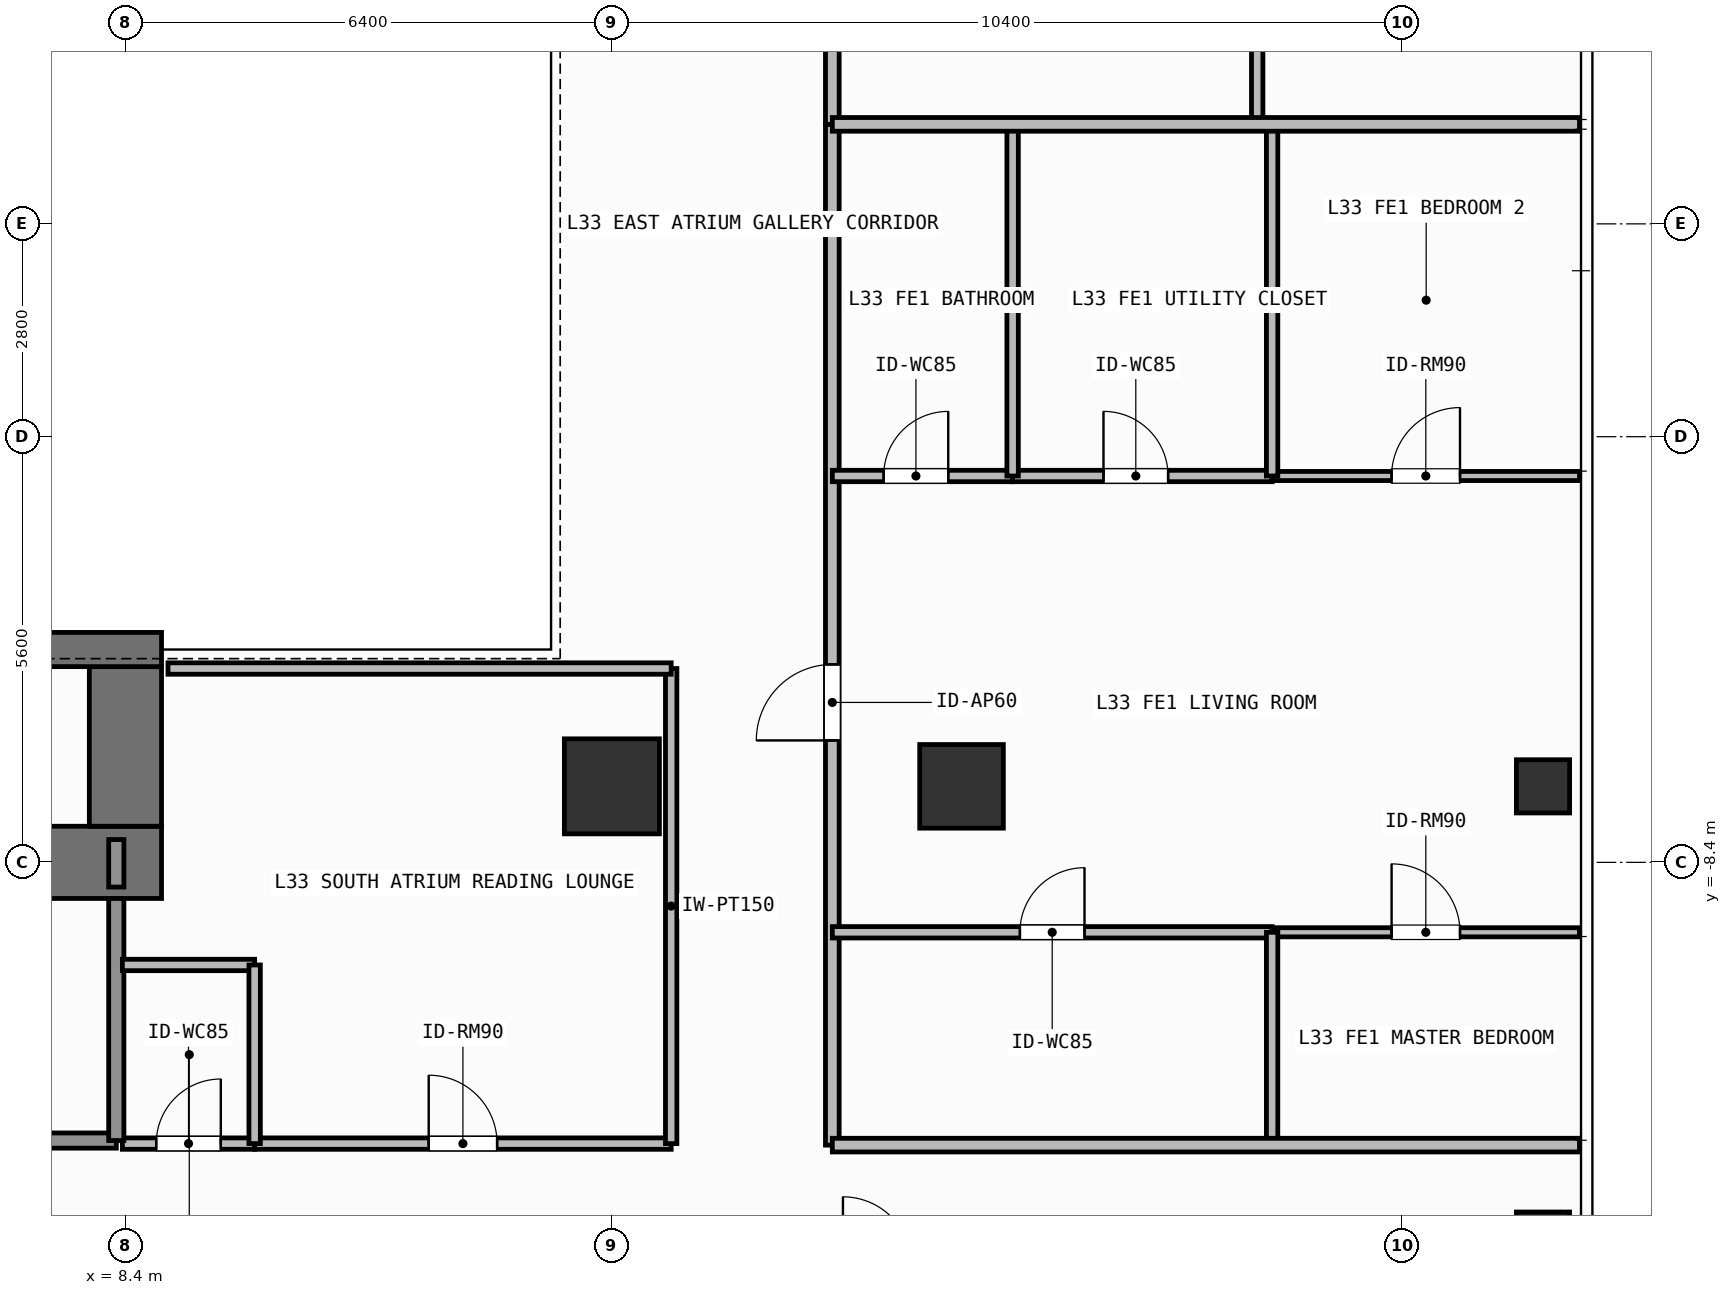
"""IFC4 building model, lengths in metres.
Left out: names, types, materials, properties, quantities, classifications, styles, units other than length and angle.
Written with IfcOpenShell. Run it as: python <this file> out.ifc"""

import sys

from ifc_helpers import new_model, si_unit, direction, frame, frame_2d, origin, origin_2d, place, context, subcontext, project, spatial, rectangle, hollow_rectangle, extrude, element, fill, save


model = new_model("IFC4")
c1 = context("Model", 3, precision=1e-05, world=origin(), true_north=direction((0.0, 1.0)))
c2 = subcontext(c1, "Body", "Model", "MODEL_VIEW")
j1 = project(units=[si_unit("LENGTHUNIT", "METRE"), si_unit("PLANEANGLEUNIT", "RADIAN")], contexts=[c1])
p1 = place(None, origin())
s1 = spatial("IfcSite", under=j1, at=p1, CompositionType="ELEMENT")
p2 = place(p1, origin())
s2 = spatial("IfcBuilding", under=s1, at=p2, CompositionType="ELEMENT")
p3 = place(p2, frame((0.0, 0.0, 132.9)))
s3 = spatial("IfcBuildingStorey", under=s2, at=p3, CompositionType="ELEMENT", Elevation=132.9)
p4 = place(p3, frame((6.12, -8.4, 0.0), z_axis=(0.0, 0.0, 1.0), x_axis=(1.0, 0.0, 0.0)))
e1 = element("IfcWall", 1, at=p4, inside=s3, PredefinedType="SHEAR", context=c2, shape_type="SweptSolid", body=[
    extrude(rectangle(XDim=2.755, YDim=0.95, at=frame_2d((1.377, 0.0))), origin(), (0.0, 0.0, 1.0), 3.9),
])
p5 = place(p3, frame((8.4, -7.925, 0.0), z_axis=(0.0, 0.0, 1.0), x_axis=(0.0, 1.0, 0.0)))
e2 = element("IfcWall", 2, at=p5, inside=s3, PredefinedType="SHEAR", context=c2, shape_type="SweptSolid", body=[
    extrude(rectangle(XDim=2.1, YDim=0.95, at=frame_2d((1.05, 0.0))), origin(), (0.0, 0.0, 1.0), 3.9),
])
p6 = place(p3, frame((3.045, -5.6, 0.0), z_axis=(0.0, 0.0, 1.0), x_axis=(1.0, 0.0, 0.0)))
e3 = element("IfcWall", 3, at=p6, inside=s3, PredefinedType="SHEAR", context=c2, shape_type="SweptSolid", body=[
    extrude(rectangle(XDim=5.83, YDim=0.45, at=frame_2d((2.915, 0.0))), origin(), (0.0, 0.0, 1.0), 3.9),
])
p7 = place(p3, frame((14.8, -7.4, 0.0), z_axis=(0.0, 0.0, 1.0), x_axis=(1.0, 0.0, 0.0)))
e4 = element("IfcColumn", 4, at=p7, inside=s3, PredefinedType="COLUMN", context=c2, shape_type="SweptSolid", body=[
    extrude(rectangle(XDim=1.25, YDim=1.25, at=origin_2d()), origin(), (0.0, 0.0, 1.0), 3.9),
])
p8 = place(p3, frame((19.4, -7.4, 0.0), z_axis=(0.0, 0.0, 1.0), x_axis=(1.0, 0.0, 0.0)))
e5 = element("IfcColumn", 5, at=p8, inside=s3, PredefinedType="COLUMN", context=c2, shape_type="SweptSolid", body=[
    extrude(rectangle(XDim=1.1, YDim=1.1, at=origin_2d()), origin(), (0.0, 0.0, 1.0), 3.9),
])
for number, where, z_axis, x_axis in (
    (6, (27.05, -13.35, 0.0), (0.0, 0.0, 1.0), (1.0, 0.0, 0.0)),
    (7, (27.05, -7.4, 0.0), (0.0, 0.0, 1.0), (1.0, 0.0, 0.0)),
):
    element("IfcColumn", number, at=place(p3, frame(where, z_axis=z_axis, x_axis=x_axis)), inside=s3, PredefinedType="COLUMN", context=c2, shape_type="SweptSolid", body=[
        extrude(hollow_rectangle(XDim=0.7, YDim=0.7, WallThickness=0.032, at=origin_2d()), origin(), (0.0, 0.0, 1.0), 3.9),
    ])
p9 = place(p3, frame((4.58, -12.06, 0.0), z_axis=(0.0, 0.0, 1.0), x_axis=(1.0, 0.0, 0.0)))
e8 = element("IfcWall", 8, at=p9, inside=s3, PredefinedType="SOLIDWALL", context=c2, shape_type="SweptSolid", body=[
    extrude(rectangle(XDim=3.7, YDim=0.2, at=frame_2d((1.85, 0.0))), origin(), (0.0, 0.0, 1.0), 3.62),
])
p10 = place(p9, frame((1.212, 0.0, 0.0)))
e9 = element("IfcOpeningElement", 9, at=p10, cuts=e8, PredefinedType="OPENING", context=c2, shape_type="SweptSolid", body=[
    extrude(rectangle(XDim=1.1, YDim=2.15, at=frame_2d((0.55, 1.075))), frame((0.0, 0.11, 0.0), z_axis=(0.0, -1.0, 0.0), x_axis=(1.0, 0.0, 0.0)), (0.0, 0.0, 1.0), 0.22),
])
p11 = place(p3, frame((8.36, -12.1, 0.0), z_axis=(0.0, 0.0, 1.0), x_axis=(1.0, 0.0, 0.0)))
e10 = element("IfcWall", 10, at=p11, inside=s3, PredefinedType="PARTITIONING", context=c2, shape_type="SweptSolid", body=[
    extrude(rectangle(XDim=1.74, YDim=0.15, at=frame_2d((0.87, 0.0))), origin(), (0.0, 0.0, 1.0), 3.62),
])
p12 = place(p11, frame((0.445, 0.0, 0.0)))
e11 = element("IfcOpeningElement", 11, at=p12, cuts=e10, PredefinedType="OPENING", context=c2, shape_type="SweptSolid", body=[
    extrude(rectangle(XDim=0.85, YDim=2.1, at=frame_2d((0.425, 1.05))), frame((0.0, 0.085, 0.0), z_axis=(0.0, -1.0, 0.0), x_axis=(1.0, 0.0, 0.0)), (0.0, 0.0, 1.0), 0.17),
])
p13 = place(p3, frame((10.1, -12.1, 0.0), z_axis=(0.0, 0.0, 1.0), x_axis=(1.0, 0.0, 0.0)))
e12 = element("IfcWall", 12, at=p13, inside=s3, PredefinedType="PARTITIONING", context=c2, shape_type="SweptSolid", body=[
    extrude(rectangle(XDim=5.48, YDim=0.15, at=frame_2d((2.74, 0.0))), origin(), (0.0, 0.0, 1.0), 3.62),
])
p14 = place(p13, frame((2.29, 0.0, 0.0)))
e13 = element("IfcOpeningElement", 13, at=p14, cuts=e12, PredefinedType="OPENING", context=c2, shape_type="SweptSolid", body=[
    extrude(rectangle(XDim=0.9, YDim=2.1, at=frame_2d((0.45, 1.05))), frame((0.0, 0.085, 0.0), z_axis=(0.0, -1.0, 0.0), x_axis=(1.0, 0.0, 0.0)), (0.0, 0.0, 1.0), 0.17),
])
p15 = place(p3, frame((17.7, -12.12, 0.0), z_axis=(0.0, 0.0, 1.0), x_axis=(0.0, 1.0, 0.0)))
e14 = element("IfcWall", 14, at=p15, inside=s3, PredefinedType="PARTITIONING", context=c2, shape_type="SweptSolid", body=[
    extrude(rectangle(XDim=13.429, YDim=0.18, at=frame_2d((6.715, 0.0))), origin(), (0.0, 0.0, 1.0), 3.62),
])
p16 = place(p15, frame((5.324, 0.0, 0.0)))
e15 = element("IfcOpeningElement", 15, at=p16, cuts=e14, PredefinedType="OPENING", context=c2, shape_type="SweptSolid", body=[
    extrude(rectangle(XDim=1.0, YDim=2.2, at=frame_2d((0.5, 1.1))), frame((0.0, 0.1, 0.0), z_axis=(0.0, -1.0, 0.0), x_axis=(1.0, 0.0, 0.0)), (0.0, 0.0, 1.0), 0.2),
])
p17 = place(p3, frame((17.7, -3.317, 0.0), z_axis=(0.0, 0.0, 1.0), x_axis=(1.0, 0.0, 0.0)))
e16 = element("IfcWall", 16, at=p17, inside=s3, PredefinedType="PARTITIONING", context=c2, shape_type="SweptSolid", body=[
    extrude(rectangle(XDim=2.372, YDim=0.15, at=frame_2d((1.186, 0.0))), origin(), (0.0, 0.0, 1.0), 3.62),
])
p18 = place(p17, frame((0.675, 0.0, 0.0)))
e17 = element("IfcOpeningElement", 17, at=p18, cuts=e16, PredefinedType="OPENING", context=c2, shape_type="SweptSolid", body=[
    extrude(rectangle(XDim=0.85, YDim=2.1, at=frame_2d((0.425, 1.05))), frame((0.0, 0.085, 0.0), z_axis=(0.0, -1.0, 0.0), x_axis=(1.0, 0.0, 0.0)), (0.0, 0.0, 1.0), 0.17),
])
p19 = place(p3, frame((20.072, -3.317, 0.0), z_axis=(0.0, 0.0, 1.0), x_axis=(1.0, 0.0, 0.0)))
e18 = element("IfcWall", 18, at=p19, inside=s3, PredefinedType="PARTITIONING", context=c2, shape_type="SweptSolid", body=[
    extrude(rectangle(XDim=3.414, YDim=0.15, at=frame_2d((1.707, 0.0))), origin(), (0.0, 0.0, 1.0), 3.62),
])
p20 = place(p19, frame((1.196, 0.0, 0.0)))
e19 = element("IfcOpeningElement", 19, at=p20, cuts=e18, PredefinedType="OPENING", context=c2, shape_type="SweptSolid", body=[
    extrude(rectangle(XDim=0.85, YDim=2.1, at=frame_2d((0.425, 1.05))), frame((0.0, 0.085, 0.0), z_axis=(0.0, -1.0, 0.0), x_axis=(1.0, 0.0, 0.0)), (0.0, 0.0, 1.0), 0.17),
])
p21 = place(p3, frame((17.7, -9.32, 0.0), z_axis=(0.0, 0.0, 1.0), x_axis=(1.0, 0.0, 0.0)))
e20 = element("IfcWall", 20, at=p21, inside=s3, PredefinedType="PARTITIONING", context=c2, shape_type="SweptSolid", body=[
    extrude(rectangle(XDim=5.786, YDim=0.15, at=frame_2d((2.893, 0.0))), origin(), (0.0, 0.0, 1.0), 3.62),
])
p22 = place(p21, frame((2.468, 0.0, 0.0)))
e21 = element("IfcOpeningElement", 21, at=p22, cuts=e20, PredefinedType="OPENING", context=c2, shape_type="SweptSolid", body=[
    extrude(rectangle(XDim=0.85, YDim=2.1, at=frame_2d((0.425, 1.05))), frame((0.0, 0.085, 0.0), z_axis=(0.0, -1.0, 0.0), x_axis=(1.0, 0.0, 0.0)), (0.0, 0.0, 1.0), 0.17),
])
p23 = place(p3, frame((23.486, -9.32, 0.0), z_axis=(0.0, 0.0, 1.0), x_axis=(1.0, 0.0, 0.0)))
e22 = element("IfcWall", 22, at=p23, inside=s3, PredefinedType="PARTITIONING", context=c2, shape_type="SweptSolid", body=[
    extrude(rectangle(XDim=4.044, YDim=0.12, at=frame_2d((2.022, 0.0))), origin(), (0.0, 0.0, 1.0), 3.62),
])
p24 = place(p23, frame((1.572, 0.0, 0.0)))
e23 = element("IfcOpeningElement", 23, at=p24, cuts=e22, PredefinedType="OPENING", context=c2, shape_type="SweptSolid", body=[
    extrude(rectangle(XDim=0.9, YDim=2.1, at=frame_2d((0.45, 1.05))), frame((0.0, 0.07, 0.0), z_axis=(0.0, -1.0, 0.0), x_axis=(1.0, 0.0, 0.0)), (0.0, 0.0, 1.0), 0.14),
])
p25 = place(p3, frame((23.486, -3.317, 0.0), z_axis=(0.0, 0.0, 1.0), x_axis=(1.0, 0.0, 0.0)))
e24 = element("IfcWall", 24, at=p25, inside=s3, PredefinedType="PARTITIONING", context=c2, shape_type="SweptSolid", body=[
    extrude(rectangle(XDim=4.044, YDim=0.12, at=frame_2d((2.022, 0.0))), origin(), (0.0, 0.0, 1.0), 3.62),
])
p26 = place(p25, frame((1.572, 0.0, 0.0)))
e25 = element("IfcOpeningElement", 25, at=p26, cuts=e24, PredefinedType="OPENING", context=c2, shape_type="SweptSolid", body=[
    extrude(rectangle(XDim=0.9, YDim=2.1, at=frame_2d((0.45, 1.05))), frame((0.0, 0.07, 0.0), z_axis=(0.0, -1.0, 0.0), x_axis=(1.0, 0.0, 0.0)), (0.0, 0.0, 1.0), 0.14),
])
p27 = place(p3, frame((17.7, 1.309, 0.0), z_axis=(0.0, 0.0, 1.0), x_axis=(0.0, 1.0, 0.0)))
e26 = element("IfcWall", 26, at=p27, inside=s3, PredefinedType="PARTITIONING", context=c2, shape_type="SweptSolid", body=[
    extrude(rectangle(XDim=10.811, YDim=0.18, at=frame_2d((5.406, 0.0))), origin(), (0.0, 0.0, 1.0), 3.62),
])
p28 = place(p27, frame((4.458, 0.0, 0.0)))
e27 = element("IfcOpeningElement", 27, at=p28, cuts=e26, PredefinedType="OPENING", context=c2, shape_type="SweptSolid", body=[
    extrude(rectangle(XDim=1.0, YDim=2.2, at=frame_2d((0.5, 1.1))), frame((0.0, 0.1, 0.0), z_axis=(0.0, -1.0, 0.0), x_axis=(1.0, 0.0, 0.0)), (0.0, 0.0, 1.0), 0.2),
])
p29 = place(p3, frame((8.28, -12.06, 0.0), z_axis=(0.0, 0.0, 1.0), x_axis=(0.0, 1.0, 0.0)))
e28 = element("IfcWall", 28, at=p29, inside=s3, PredefinedType="SOLIDWALL", context=c2, shape_type="SweptSolid", body=[
    extrude(rectangle(XDim=3.185, YDim=0.2, at=frame_2d((1.593, 0.0))), origin(), (0.0, 0.0, 1.0), 3.62),
])
p30 = place(p3, frame((8.28, -8.725, 0.0), z_axis=(0.0, 0.0, 1.0), x_axis=(0.0, 1.0, 0.0)))
e29 = element("IfcWall", 29, at=p30, inside=s3, PredefinedType="SOLIDWALL", context=c2, shape_type="SweptSolid", body=[
    extrude(rectangle(XDim=0.625, YDim=0.2, at=frame_2d((0.312, 0.0))), origin(), (0.0, 0.0, 1.0), 3.62),
])
p31 = place(p3, frame((8.36, -9.75, 0.0), z_axis=(0.0, 0.0, 1.0), x_axis=(1.0, 0.0, 0.0)))
e30 = element("IfcWall", 30, at=p31, inside=s3, PredefinedType="PARTITIONING", context=c2, shape_type="SweptSolid", body=[
    extrude(rectangle(XDim=1.74, YDim=0.15, at=frame_2d((0.87, 0.0))), origin(), (0.0, 0.0, 1.0), 3.62),
])
p32 = place(p3, frame((10.1, -12.1, 0.0), z_axis=(0.0, 0.0, 1.0), x_axis=(0.0, 1.0, 0.0)))
e31 = element("IfcWall", 31, at=p32, inside=s3, PredefinedType="PARTITIONING", context=c2, shape_type="SweptSolid", body=[
    extrude(rectangle(XDim=2.35, YDim=0.15, at=frame_2d((1.175, 0.0))), origin(), (0.0, 0.0, 1.0), 3.62),
])
p33 = place(p3, frame((15.58, -12.1, 0.0), z_axis=(0.0, 0.0, 1.0), x_axis=(0.0, 1.0, 0.0)))
e32 = element("IfcWall", 32, at=p33, inside=s3, PredefinedType="PARTITIONING", context=c2, shape_type="SweptSolid", body=[
    extrude(rectangle(XDim=6.25, YDim=0.15, at=frame_2d((3.125, 0.0))), origin(), (0.0, 0.0, 1.0), 3.62),
])
p34 = place(p3, frame((8.96, -5.85, 0.0), z_axis=(0.0, 0.0, 1.0), x_axis=(1.0, 0.0, 0.0)))
e33 = element("IfcWall", 33, at=p34, inside=s3, PredefinedType="PARTITIONING", context=c2, shape_type="SweptSolid", body=[
    extrude(rectangle(XDim=6.62, YDim=0.15, at=frame_2d((3.31, 0.0))), origin(), (0.0, 0.0, 1.0), 3.62),
])
p35 = place(p3, frame((20.072, -3.317, 0.0), z_axis=(0.0, 0.0, 1.0), x_axis=(0.0, 1.0, 0.0)))
e34 = element("IfcWall", 34, at=p35, inside=s3, PredefinedType="PARTITIONING", context=c2, shape_type="SweptSolid", body=[
    extrude(rectangle(XDim=4.626, YDim=0.15, at=frame_2d((2.313, 0.0))), origin(), (0.0, 0.0, 1.0), 3.62),
])
p36 = place(p3, frame((23.486, -12.12, 0.0), z_axis=(0.0, 0.0, 1.0), x_axis=(0.0, 1.0, 0.0)))
e35 = element("IfcWall", 35, at=p36, inside=s3, PredefinedType="PARTITIONING", context=c2, shape_type="SweptSolid", body=[
    extrude(rectangle(XDim=2.8, YDim=0.15, at=frame_2d((1.4, 0.0))), origin(), (0.0, 0.0, 1.0), 3.62),
])
p37 = place(p3, frame((23.486, -3.317, 0.0), z_axis=(0.0, 0.0, 1.0), x_axis=(0.0, 1.0, 0.0)))
e36 = element("IfcWall", 36, at=p37, inside=s3, PredefinedType="PARTITIONING", context=c2, shape_type="SweptSolid", body=[
    extrude(rectangle(XDim=4.626, YDim=0.15, at=frame_2d((2.313, 0.0))), origin(), (0.0, 0.0, 1.0), 3.62),
])
p38 = place(p3, frame((23.29, 1.309, 0.0), z_axis=(0.0, 0.0, 1.0), x_axis=(0.0, 1.0, 0.0)))
e37 = element("IfcWall", 37, at=p38, inside=s3, PredefinedType="PARTITIONING", context=c2, shape_type="SweptSolid", body=[
    extrude(rectangle(XDim=3.303, YDim=0.15, at=frame_2d((1.651, 0.0))), origin(), (0.0, 0.0, 1.0), 3.62),
])
for number, where, z_axis, x_axis in (
    (38, (17.7, 1.309, 0.0), (0.0, 0.0, 1.0), (1.0, 0.0, 0.0)),
    (39, (17.7, -12.12, 0.0), (0.0, 0.0, 1.0), (1.0, 0.0, 0.0)),
):
    element("IfcWall", number, at=place(p3, frame(where, z_axis=z_axis, x_axis=x_axis)), inside=s3, PredefinedType="PARTITIONING", context=c2, shape_type="SweptSolid", body=[
        extrude(rectangle(XDim=9.83, YDim=0.18, at=frame_2d((4.915, 0.0))), origin(), (0.0, 0.0, 1.0), 3.62),
    ])
p39 = place(p12, origin())
e40 = element("IfcDoor", 40, at=p39, inside=s3, OperationType="SINGLE_SWING_RIGHT", PredefinedType="DOOR", context=c2, shape_type="SweptSolid", body=[
    extrude(rectangle(XDim=0.85, YDim=2.1, at=frame_2d((0.425, 1.05))), frame((0.0, 0.025, 0.0), z_axis=(0.0, -1.0, 0.0), x_axis=(1.0, 0.0, 0.0)), (0.0, 0.0, 1.0), 0.05),
])
fill(e11, e40)
p40 = place(p14, origin())
e41 = element("IfcDoor", 41, at=p40, inside=s3, OperationType="SINGLE_SWING_LEFT", PredefinedType="DOOR", context=c2, shape_type="SweptSolid", body=[
    extrude(rectangle(XDim=0.9, YDim=2.1, at=frame_2d((0.45, 1.05))), frame((0.0, 0.025, 0.0), z_axis=(0.0, -1.0, 0.0), x_axis=(1.0, 0.0, 0.0)), (0.0, 0.0, 1.0), 0.05),
])
fill(e13, e41)
p41 = place(p16, origin())
e42 = element("IfcDoor", 42, at=p41, inside=s3, OperationType="SINGLE_SWING_LEFT", PredefinedType="DOOR", context=c2, shape_type="SweptSolid", body=[
    extrude(rectangle(XDim=1.0, YDim=2.2, at=frame_2d((0.5, 1.1))), frame((0.0, 0.025, 0.0), z_axis=(0.0, -1.0, 0.0), x_axis=(1.0, 0.0, 0.0)), (0.0, 0.0, 1.0), 0.05),
])
fill(e15, e42)
p42 = place(p18, origin())
e43 = element("IfcDoor", 43, at=p42, inside=s3, OperationType="SINGLE_SWING_RIGHT", PredefinedType="DOOR", context=c2, shape_type="SweptSolid", body=[
    extrude(rectangle(XDim=0.85, YDim=2.1, at=frame_2d((0.425, 1.05))), frame((0.0, 0.025, 0.0), z_axis=(0.0, -1.0, 0.0), x_axis=(1.0, 0.0, 0.0)), (0.0, 0.0, 1.0), 0.05),
])
fill(e17, e43)
p43 = place(p20, origin())
e44 = element("IfcDoor", 44, at=p43, inside=s3, OperationType="SINGLE_SWING_LEFT", PredefinedType="DOOR", context=c2, shape_type="SweptSolid", body=[
    extrude(rectangle(XDim=0.85, YDim=2.1, at=frame_2d((0.425, 1.05))), frame((0.0, 0.025, 0.0), z_axis=(0.0, -1.0, 0.0), x_axis=(1.0, 0.0, 0.0)), (0.0, 0.0, 1.0), 0.05),
])
fill(e19, e44)
p44 = place(p22, origin())
e45 = element("IfcDoor", 45, at=p44, inside=s3, OperationType="SINGLE_SWING_RIGHT", PredefinedType="DOOR", context=c2, shape_type="SweptSolid", body=[
    extrude(rectangle(XDim=0.85, YDim=2.1, at=frame_2d((0.425, 1.05))), frame((0.0, 0.025, 0.0), z_axis=(0.0, -1.0, 0.0), x_axis=(1.0, 0.0, 0.0)), (0.0, 0.0, 1.0), 0.05),
])
fill(e21, e45)
p45 = place(p24, origin())
e46 = element("IfcDoor", 46, at=p45, inside=s3, OperationType="SINGLE_SWING_LEFT", PredefinedType="DOOR", context=c2, shape_type="SweptSolid", body=[
    extrude(rectangle(XDim=0.9, YDim=2.1, at=frame_2d((0.45, 1.05))), frame((0.0, 0.025, 0.0), z_axis=(0.0, -1.0, 0.0), x_axis=(1.0, 0.0, 0.0)), (0.0, 0.0, 1.0), 0.05),
])
fill(e23, e46)
p46 = place(p26, origin())
e47 = element("IfcDoor", 47, at=p46, inside=s3, OperationType="SINGLE_SWING_RIGHT", PredefinedType="DOOR", context=c2, shape_type="SweptSolid", body=[
    extrude(rectangle(XDim=0.9, YDim=2.1, at=frame_2d((0.45, 1.05))), frame((0.0, 0.025, 0.0), z_axis=(0.0, -1.0, 0.0), x_axis=(1.0, 0.0, 0.0)), (0.0, 0.0, 1.0), 0.05),
])
fill(e25, e47)
save(model, sys.argv[1])
